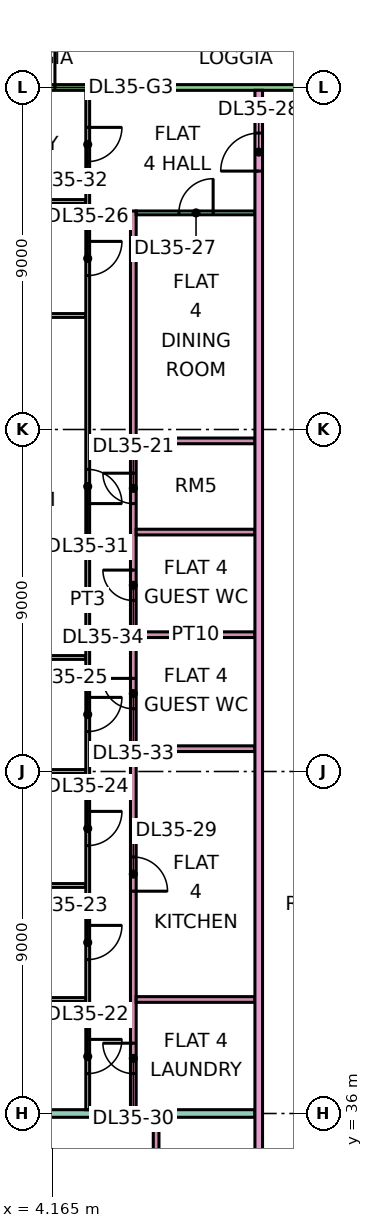
"""IFC4 building model, lengths in metres.
Left out: names, types, materials, properties, quantities, classifications, styles, units other than length and angle.
Written with IfcOpenShell. Run it as: python <this file> out.ifc"""

import sys

from ifc_helpers import new_model, si_unit, direction, frame, frame_2d, origin, place, context, subcontext, project, spatial, rectangle, extrude, element, fill, save


model = new_model("IFC4")
c1 = context("Model", 3, precision=1e-05, world=origin(), true_north=direction((0.0, 1.0)))
c2 = subcontext(c1, "Body", "Model", "MODEL_VIEW")
j1 = project(units=[si_unit("LENGTHUNIT", "METRE"), si_unit("PLANEANGLEUNIT", "RADIAN")], contexts=[c1])
p1 = place(None, origin())
s1 = spatial("IfcSite", under=j1, at=p1, CompositionType="ELEMENT")
p2 = place(p1, origin())
s2 = spatial("IfcBuilding", under=s1, at=p2, CompositionType="ELEMENT")
p3 = place(p2, frame((0.0, 0.0, 157.4)))
s3 = spatial("IfcBuildingStorey", under=s2, at=p3, CompositionType="ELEMENT", Elevation=157.4)
p4 = place(p3, frame((11.925, 63.0, 0.0), z_axis=(0.0, 0.0, 1.0), x_axis=(-1.0, 0.0, 0.0)))
e1 = element("IfcWall", 1, at=p4, inside=s3, PredefinedType="SOLIDWALL", context=c2, shape_type="SweptSolid", body=[
    extrude(rectangle(XDim=10.35, YDim=0.15, at=frame_2d((5.175, 0.0))), origin(), (0.0, 0.0, 1.0), 3.35),
])
p5 = place(p4, frame((7.688, 0.0, 0.0)))
e2 = element("IfcOpeningElement", 2, at=p5, cuts=e1, PredefinedType="OPENING", context=c2, shape_type="SweptSolid", body=[
    extrude(rectangle(XDim=1.8, YDim=2.4, at=frame_2d((0.9, 1.2))), frame((0.0, 0.085, 0.0), z_axis=(0.0, -1.0, 0.0), x_axis=(1.0, 0.0, 0.0)), (0.0, 0.0, 1.0), 0.17),
])
for number, where, z_axis, x_axis in (
    (3, (-1.351, 39.0, 0.0), (0.0, 0.0, 1.0), (1.0, 0.0, 0.0)),
    (4, (-1.351, 42.0, 0.0), (0.0, 0.0, 1.0), (1.0, 0.0, 0.0)),
    (5, (-1.351, 45.0, 0.0), (0.0, 0.0, 1.0), (1.0, 0.0, 0.0)),
):
    element("IfcWall", number, at=place(p3, frame(where, z_axis=z_axis, x_axis=x_axis)), inside=s3, PredefinedType="PARTITIONING", context=c2, shape_type="SweptSolid", body=[
        extrude(rectangle(XDim=6.401, YDim=0.1, at=frame_2d((3.201, 0.0))), origin(), (0.0, 0.0, 1.0), 3.35),
    ])
p6 = place(p3, frame((0.0, 36.0, 0.0), z_axis=(0.0, 0.0, 1.0), x_axis=(1.0, 0.0, 0.0)))
e6 = element("IfcWall", 6, at=p6, inside=s3, PredefinedType="PARTITIONING", context=c2, shape_type="SweptSolid", body=[
    extrude(rectangle(XDim=9.5, YDim=0.2, at=frame_2d((4.75, 0.0))), origin(), (0.0, 0.0, 1.0), 3.35),
])
p7 = place(p3, frame((0.0, 48.0, 0.0), z_axis=(0.0, 0.0, 1.0), x_axis=(1.0, 0.0, 0.0)))
e7 = element("IfcWall", 7, at=p7, inside=s3, PredefinedType="PARTITIONING", context=c2, shape_type="SweptSolid", body=[
    extrude(rectangle(XDim=5.05, YDim=0.1, at=frame_2d((2.525, 0.0))), origin(), (0.0, 0.0, 1.0), 3.35),
])
for number, where, z_axis, x_axis in (
    (8, (0.074, 57.0, 0.0), (0.0, 0.0, 1.0), (1.0, 0.0, 0.0)),
    (9, (0.074, 60.0, 0.0), (0.0, 0.0, 1.0), (1.0, 0.0, 0.0)),
):
    element("IfcWall", number, at=place(p3, frame(where, z_axis=z_axis, x_axis=x_axis)), inside=s3, PredefinedType="PARTITIONING", context=c2, shape_type="SweptSolid", body=[
        extrude(rectangle(XDim=4.976, YDim=0.1, at=frame_2d((2.488, 0.0))), origin(), (0.0, 0.0, 1.0), 3.35),
    ])
p8 = place(p3, frame((5.1, 36.1, 0.0), z_axis=(0.0, 0.0, 1.0), x_axis=(0.0, 1.0, 0.0)))
e10 = element("IfcWall", 10, at=p8, inside=s3, PredefinedType="PARTITIONING", context=c2, shape_type="SweptSolid", body=[
    extrude(rectangle(XDim=26.826, YDim=0.1, at=frame_2d((13.413, 0.0))), origin(), (0.0, 0.0, 1.0), 3.35),
])
p9 = place(p8, frame((0.95, 0.0, 0.0)))
e11 = element("IfcOpeningElement", 11, at=p9, cuts=e10, PredefinedType="OPENING", context=c2, shape_type="SweptSolid", body=[
    extrude(rectangle(XDim=0.9, YDim=2.1, at=frame_2d((0.45, 1.05))), frame((0.0, 0.06, 0.0), z_axis=(0.0, -1.0, 0.0), x_axis=(1.0, 0.0, 0.0)), (0.0, 0.0, 1.0), 0.12),
])
p10 = place(p8, frame((3.95, 0.0, 0.0)))
e12 = element("IfcOpeningElement", 12, at=p10, cuts=e10, PredefinedType="OPENING", context=c2, shape_type="SweptSolid", body=[
    extrude(rectangle(XDim=0.9, YDim=2.1, at=frame_2d((0.45, 1.05))), frame((0.0, 0.06, 0.0), z_axis=(0.0, -1.0, 0.0), x_axis=(1.0, 0.0, 0.0)), (0.0, 0.0, 1.0), 0.12),
])
p11 = place(p8, frame((6.95, 0.0, 0.0)))
e13 = element("IfcOpeningElement", 13, at=p11, cuts=e10, PredefinedType="OPENING", context=c2, shape_type="SweptSolid", body=[
    extrude(rectangle(XDim=0.9, YDim=2.1, at=frame_2d((0.45, 1.05))), frame((0.0, 0.06, 0.0), z_axis=(0.0, -1.0, 0.0), x_axis=(1.0, 0.0, 0.0)), (0.0, 0.0, 1.0), 0.12),
])
p12 = place(p8, frame((9.95, 0.0, 0.0)))
e14 = element("IfcOpeningElement", 14, at=p12, cuts=e10, PredefinedType="OPENING", context=c2, shape_type="SweptSolid", body=[
    extrude(rectangle(XDim=0.9, YDim=2.1, at=frame_2d((0.45, 1.05))), frame((0.0, 0.06, 0.0), z_axis=(0.0, -1.0, 0.0), x_axis=(1.0, 0.0, 0.0)), (0.0, 0.0, 1.0), 0.12),
])
p13 = place(p8, frame((21.95, 0.0, 0.0)))
e15 = element("IfcOpeningElement", 15, at=p13, cuts=e10, PredefinedType="OPENING", context=c2, shape_type="SweptSolid", body=[
    extrude(rectangle(XDim=0.9, YDim=2.1, at=frame_2d((0.45, 1.05))), frame((0.0, 0.06, 0.0), z_axis=(0.0, -1.0, 0.0), x_axis=(1.0, 0.0, 0.0)), (0.0, 0.0, 1.0), 0.12),
])
p14 = place(p8, frame((15.95, 0.0, 0.0)))
e16 = element("IfcOpeningElement", 16, at=p14, cuts=e10, PredefinedType="OPENING", context=c2, shape_type="SweptSolid", body=[
    extrude(rectangle(XDim=0.9, YDim=2.1, at=frame_2d((0.45, 1.05))), frame((0.0, 0.06, 0.0), z_axis=(0.0, -1.0, 0.0), x_axis=(1.0, 0.0, 0.0)), (0.0, 0.0, 1.0), 0.12),
])
p15 = place(p8, frame((24.95, 0.0, 0.0)))
e17 = element("IfcOpeningElement", 17, at=p15, cuts=e10, PredefinedType="OPENING", context=c2, shape_type="SweptSolid", body=[
    extrude(rectangle(XDim=0.9, YDim=2.1, at=frame_2d((0.45, 1.05))), frame((0.0, 0.06, 0.0), z_axis=(0.0, -1.0, 0.0), x_axis=(1.0, 0.0, 0.0)), (0.0, 0.0, 1.0), 0.12),
])
p16 = place(p3, frame((6.3, 36.1, 0.0), z_axis=(0.0, 0.0, 1.0), x_axis=(0.0, 1.0, 0.0)))
e18 = element("IfcWall", 18, at=p16, inside=s3, PredefinedType="PARTITIONING", context=c2, shape_type="SweptSolid", body=[
    extrude(rectangle(XDim=23.65, YDim=0.15, at=frame_2d((11.825, 0.0))), origin(), (0.0, 0.0, 1.0), 3.35),
])
p17 = place(p16, frame((15.95, 0.0, 0.0)))
e19 = element("IfcOpeningElement", 19, at=p17, cuts=e18, PredefinedType="OPENING", context=c2, shape_type="SweptSolid", body=[
    extrude(rectangle(XDim=0.8, YDim=2.1, at=frame_2d((0.4, 1.05))), frame((0.0, 0.085, 0.0), z_axis=(0.0, -1.0, 0.0), x_axis=(1.0, 0.0, 0.0)), (0.0, 0.0, 1.0), 0.17),
])
p18 = place(p16, frame((5.75, 0.0, 0.0)))
e20 = element("IfcOpeningElement", 20, at=p18, cuts=e18, PredefinedType="OPENING", context=c2, shape_type="SweptSolid", body=[
    extrude(rectangle(XDim=0.9, YDim=2.1, at=frame_2d((0.45, 1.05))), frame((0.0, 0.085, 0.0), z_axis=(0.0, -1.0, 0.0), x_axis=(1.0, 0.0, 0.0)), (0.0, 0.0, 1.0), 0.17),
])
p19 = place(p16, frame((0.95, 0.0, 0.0)))
e21 = element("IfcOpeningElement", 21, at=p19, cuts=e18, PredefinedType="OPENING", context=c2, shape_type="SweptSolid", body=[
    extrude(rectangle(XDim=0.8, YDim=2.1, at=frame_2d((0.4, 1.05))), frame((0.0, 0.085, 0.0), z_axis=(0.0, -1.0, 0.0), x_axis=(1.0, 0.0, 0.0)), (0.0, 0.0, 1.0), 0.17),
])
p20 = place(p16, frame((10.55, 0.0, 0.0)))
e22 = element("IfcOpeningElement", 22, at=p20, cuts=e18, PredefinedType="OPENING", context=c2, shape_type="SweptSolid", body=[
    extrude(rectangle(XDim=0.8, YDim=2.1, at=frame_2d((0.4, 1.05))), frame((0.0, 0.085, 0.0), z_axis=(0.0, -1.0, 0.0), x_axis=(1.0, 0.0, 0.0)), (0.0, 0.0, 1.0), 0.17),
])
p21 = place(p16, frame((13.4, 0.0, 0.0)))
e23 = element("IfcOpeningElement", 23, at=p21, cuts=e18, PredefinedType="OPENING", context=c2, shape_type="SweptSolid", body=[
    extrude(rectangle(XDim=0.8, YDim=2.1, at=frame_2d((0.4, 1.05))), frame((0.0, 0.085, 0.0), z_axis=(0.0, -1.0, 0.0), x_axis=(1.0, 0.0, 0.0)), (0.0, 0.0, 1.0), 0.17),
])
for number, where, z_axis, x_axis in (
    (24, (6.375, 39.0, 0.0), (0.0, 0.0, 1.0), (1.0, 0.0, 0.0)),
    (25, (6.375, 45.6, 0.0), (0.0, 0.0, 1.0), (1.0, 0.0, 0.0)),
    (26, (6.375, 48.6, 0.0), (0.0, 0.0, 1.0), (1.0, 0.0, 0.0)),
    (27, (6.375, 51.3, 0.0), (0.0, 0.0, 1.0), (1.0, 0.0, 0.0)),
    (28, (6.375, 53.7, 0.0), (0.0, 0.0, 1.0), (1.0, 0.0, 0.0)),
):
    element("IfcWall", number, at=place(p3, frame(where, z_axis=z_axis, x_axis=x_axis)), inside=s3, PredefinedType="PARTITIONING", context=c2, shape_type="SweptSolid", body=[
        extrude(rectangle(XDim=3.125, YDim=0.15, at=frame_2d((1.562, 0.0))), origin(), (0.0, 0.0, 1.0), 3.35),
    ])
p22 = place(p3, frame((6.375, 59.7, 0.0), z_axis=(0.0, 0.0, 1.0), x_axis=(1.0, 0.0, 0.0)))
e29 = element("IfcWall", 29, at=p22, inside=s3, PredefinedType="PARTITIONING", context=c2, shape_type="SweptSolid", body=[
    extrude(rectangle(XDim=3.125, YDim=0.1, at=frame_2d((1.562, 0.0))), origin(), (0.0, 0.0, 1.0), 3.35),
])
p23 = place(p22, frame((1.125, 0.0, 0.0)))
e30 = element("IfcOpeningElement", 30, at=p23, cuts=e29, PredefinedType="OPENING", context=c2, shape_type="SweptSolid", body=[
    extrude(rectangle(XDim=0.9, YDim=2.1, at=frame_2d((0.45, 1.05))), frame((0.0, 0.06, 0.0), z_axis=(0.0, -1.0, 0.0), x_axis=(1.0, 0.0, 0.0)), (0.0, 0.0, 1.0), 0.12),
])
p24 = place(p3, frame((6.9, 29.325, 0.0), z_axis=(0.0, 0.0, 1.0), x_axis=(0.0, 1.0, 0.0)))
e31 = element("IfcWall", 31, at=p24, inside=s3, PredefinedType="PARTITIONING", context=c2, shape_type="SweptSolid", body=[
    extrude(rectangle(XDim=6.575, YDim=0.15, at=frame_2d((3.288, 0.0))), origin(), (0.0, 0.0, 1.0), 3.35),
])
p25 = place(p24, frame((4.575, 0.0, 0.0)))
e32 = element("IfcOpeningElement", 32, at=p25, cuts=e31, PredefinedType="OPENING", context=c2, shape_type="SweptSolid", body=[
    extrude(rectangle(XDim=0.9, YDim=2.1, at=frame_2d((0.45, 1.05))), frame((0.0, 0.085, 0.0), z_axis=(0.0, -1.0, 0.0), x_axis=(1.0, 0.0, 0.0)), (0.0, 0.0, 1.0), 0.17),
])
p26 = place(p3, frame((9.6, 20.0, 0.0), z_axis=(0.0, 0.0, 1.0), x_axis=(0.0, 1.0, 0.0)))
e33 = element("IfcWall", 33, at=p26, inside=s3, PredefinedType="PARTITIONING", context=c2, shape_type="SweptSolid", body=[
    extrude(rectangle(XDim=42.926, YDim=0.2, at=frame_2d((21.463, 0.0))), origin(), (0.0, 0.0, 1.0), 3.35),
])
p27 = place(p26, frame((40.8, 0.0, 0.0)))
e34 = element("IfcOpeningElement", 34, at=p27, cuts=e33, PredefinedType="OPENING", context=c2, shape_type="SweptSolid", body=[
    extrude(rectangle(XDim=1.0, YDim=2.1, at=frame_2d((0.5, 1.05))), frame((0.0, 0.11, 0.0), z_axis=(0.0, -1.0, 0.0), x_axis=(1.0, 0.0, 0.0)), (0.0, 0.0, 1.0), 0.22),
])
p28 = place(p26, frame((0.6, 0.0, 0.0)))
e35 = element("IfcOpeningElement", 35, at=p28, cuts=e33, PredefinedType="OPENING", context=c2, shape_type="SweptSolid", body=[
    extrude(rectangle(XDim=1.2, YDim=2.1, at=frame_2d((0.6, 1.05))), frame((0.0, 0.11, 0.0), z_axis=(0.0, -1.0, 0.0), x_axis=(1.0, 0.0, 0.0)), (0.0, 0.0, 1.0), 0.22),
])
p29 = place(p26, frame((3.9, 0.0, 0.0)))
e36 = element("IfcOpeningElement", 36, at=p29, cuts=e33, PredefinedType="OPENING", context=c2, shape_type="SweptSolid", body=[
    extrude(rectangle(XDim=1.0, YDim=2.1, at=frame_2d((0.5, 1.05))), frame((0.0, 0.11, 0.0), z_axis=(0.0, -1.0, 0.0), x_axis=(1.0, 0.0, 0.0)), (0.0, 0.0, 1.0), 0.22),
])
p30 = place(p5, frame((1.8, 0.0, 0.0), z_axis=(0.0, 0.0, 1.0), x_axis=(-1.0, 0.0, 0.0)))
e37 = element("IfcDoor", 37, at=p30, inside=s3, OperationType="DOUBLE_DOOR_SINGLE_SWING", PredefinedType="DOOR", context=c2, shape_type="SweptSolid", body=[
    extrude(rectangle(XDim=1.8, YDim=2.4, at=frame_2d((0.9, 1.2))), frame((0.0, 0.025, 0.0), z_axis=(0.0, -1.0, 0.0), x_axis=(1.0, 0.0, 0.0)), (0.0, 0.0, 1.0), 0.05),
])
fill(e2, e37)
p31 = place(p17, frame((0.8, 0.0, 0.0), z_axis=(0.0, 0.0, 1.0), x_axis=(-1.0, 0.0, 0.0)))
e38 = element("IfcDoor", 38, at=p31, inside=s3, OperationType="SINGLE_SWING_RIGHT", PredefinedType="DOOR", context=c2, shape_type="SweptSolid", body=[
    extrude(rectangle(XDim=0.8, YDim=2.1, at=frame_2d((0.4, 1.05))), frame((0.0, 0.025, 0.0), z_axis=(0.0, -1.0, 0.0), x_axis=(1.0, 0.0, 0.0)), (0.0, 0.0, 1.0), 0.05),
])
fill(e19, e38)
p32 = place(p9, origin())
e39 = element("IfcDoor", 39, at=p32, inside=s3, OperationType="SINGLE_SWING_RIGHT", PredefinedType="DOOR", context=c2, shape_type="SweptSolid", body=[
    extrude(rectangle(XDim=0.9, YDim=2.1, at=frame_2d((0.45, 1.05))), frame((0.0, 0.025, 0.0), z_axis=(0.0, -1.0, 0.0), x_axis=(1.0, 0.0, 0.0)), (0.0, 0.0, 1.0), 0.05),
])
fill(e11, e39)
p33 = place(p10, origin())
e40 = element("IfcDoor", 40, at=p33, inside=s3, OperationType="SINGLE_SWING_RIGHT", PredefinedType="DOOR", context=c2, shape_type="SweptSolid", body=[
    extrude(rectangle(XDim=0.9, YDim=2.1, at=frame_2d((0.45, 1.05))), frame((0.0, 0.025, 0.0), z_axis=(0.0, -1.0, 0.0), x_axis=(1.0, 0.0, 0.0)), (0.0, 0.0, 1.0), 0.05),
])
fill(e12, e40)
p34 = place(p11, origin())
e41 = element("IfcDoor", 41, at=p34, inside=s3, OperationType="SINGLE_SWING_RIGHT", PredefinedType="DOOR", context=c2, shape_type="SweptSolid", body=[
    extrude(rectangle(XDim=0.9, YDim=2.1, at=frame_2d((0.45, 1.05))), frame((0.0, 0.025, 0.0), z_axis=(0.0, -1.0, 0.0), x_axis=(1.0, 0.0, 0.0)), (0.0, 0.0, 1.0), 0.05),
])
fill(e13, e41)
p35 = place(p12, origin())
e42 = element("IfcDoor", 42, at=p35, inside=s3, OperationType="SINGLE_SWING_RIGHT", PredefinedType="DOOR", context=c2, shape_type="SweptSolid", body=[
    extrude(rectangle(XDim=0.9, YDim=2.1, at=frame_2d((0.45, 1.05))), frame((0.0, 0.025, 0.0), z_axis=(0.0, -1.0, 0.0), x_axis=(1.0, 0.0, 0.0)), (0.0, 0.0, 1.0), 0.05),
])
fill(e14, e42)
p36 = place(p13, origin())
e43 = element("IfcDoor", 43, at=p36, inside=s3, OperationType="SINGLE_SWING_RIGHT", PredefinedType="DOOR", context=c2, shape_type="SweptSolid", body=[
    extrude(rectangle(XDim=0.9, YDim=2.1, at=frame_2d((0.45, 1.05))), frame((0.0, 0.025, 0.0), z_axis=(0.0, -1.0, 0.0), x_axis=(1.0, 0.0, 0.0)), (0.0, 0.0, 1.0), 0.05),
])
fill(e15, e43)
p37 = place(p23, frame((0.9, 0.0, 0.0), z_axis=(0.0, 0.0, 1.0), x_axis=(-1.0, 0.0, 0.0)))
e44 = element("IfcDoor", 44, at=p37, inside=s3, OperationType="SINGLE_SWING_RIGHT", PredefinedType="DOOR", context=c2, shape_type="SweptSolid", body=[
    extrude(rectangle(XDim=0.9, YDim=2.1, at=frame_2d((0.45, 1.05))), frame((0.0, 0.025, 0.0), z_axis=(0.0, -1.0, 0.0), x_axis=(1.0, 0.0, 0.0)), (0.0, 0.0, 1.0), 0.05),
])
fill(e30, e44)
p38 = place(p27, origin())
e45 = element("IfcDoor", 45, at=p38, inside=s3, OperationType="SINGLE_SWING_LEFT", PredefinedType="DOOR", context=c2, shape_type="SweptSolid", body=[
    extrude(rectangle(XDim=1.0, YDim=2.1, at=frame_2d((0.5, 1.05))), frame((0.0, 0.025, 0.0), z_axis=(0.0, -1.0, 0.0), x_axis=(1.0, 0.0, 0.0)), (0.0, 0.0, 1.0), 0.05),
])
fill(e34, e45)
p39 = place(p18, frame((0.9, 0.0, 0.0), z_axis=(0.0, 0.0, 1.0), x_axis=(-1.0, 0.0, 0.0)))
e46 = element("IfcDoor", 46, at=p39, inside=s3, OperationType="SINGLE_SWING_LEFT", PredefinedType="DOOR", context=c2, shape_type="SweptSolid", body=[
    extrude(rectangle(XDim=0.9, YDim=2.1, at=frame_2d((0.45, 1.05))), frame((0.0, 0.025, 0.0), z_axis=(0.0, -1.0, 0.0), x_axis=(1.0, 0.0, 0.0)), (0.0, 0.0, 1.0), 0.05),
])
fill(e20, e46)
p40 = place(p19, frame((0.8, 0.0, 0.0), z_axis=(0.0, 0.0, 1.0), x_axis=(-1.0, 0.0, 0.0)))
e47 = element("IfcDoor", 47, at=p40, inside=s3, OperationType="SINGLE_SWING_RIGHT", PredefinedType="DOOR", context=c2, shape_type="SweptSolid", body=[
    extrude(rectangle(XDim=0.8, YDim=2.1, at=frame_2d((0.4, 1.05))), frame((0.0, 0.025, 0.0), z_axis=(0.0, -1.0, 0.0), x_axis=(1.0, 0.0, 0.0)), (0.0, 0.0, 1.0), 0.05),
])
fill(e21, e47)
p41 = place(p14, frame((0.9, 0.0, 0.0), z_axis=(0.0, 0.0, 1.0), x_axis=(-1.0, 0.0, 0.0)))
e48 = element("IfcDoor", 48, at=p41, inside=s3, OperationType="SINGLE_SWING_LEFT", PredefinedType="DOOR", context=c2, shape_type="SweptSolid", body=[
    extrude(rectangle(XDim=0.9, YDim=2.1, at=frame_2d((0.45, 1.05))), frame((0.0, 0.025, 0.0), z_axis=(0.0, -1.0, 0.0), x_axis=(1.0, 0.0, 0.0)), (0.0, 0.0, 1.0), 0.05),
])
fill(e16, e48)
p42 = place(p15, origin())
e49 = element("IfcDoor", 49, at=p42, inside=s3, OperationType="SINGLE_SWING_RIGHT", PredefinedType="DOOR", context=c2, shape_type="SweptSolid", body=[
    extrude(rectangle(XDim=0.9, YDim=2.1, at=frame_2d((0.45, 1.05))), frame((0.0, 0.025, 0.0), z_axis=(0.0, -1.0, 0.0), x_axis=(1.0, 0.0, 0.0)), (0.0, 0.0, 1.0), 0.05),
])
fill(e17, e49)
p43 = place(p20, frame((0.8, 0.0, 0.0), z_axis=(0.0, 0.0, 1.0), x_axis=(-1.0, 0.0, 0.0)))
e50 = element("IfcDoor", 50, at=p43, inside=s3, OperationType="SINGLE_SWING_RIGHT", PredefinedType="DOOR", context=c2, shape_type="SweptSolid", body=[
    extrude(rectangle(XDim=0.8, YDim=2.1, at=frame_2d((0.4, 1.05))), frame((0.0, 0.025, 0.0), z_axis=(0.0, -1.0, 0.0), x_axis=(1.0, 0.0, 0.0)), (0.0, 0.0, 1.0), 0.05),
])
fill(e22, e50)
p44 = place(p21, frame((0.8, 0.0, 0.0), z_axis=(0.0, 0.0, 1.0), x_axis=(-1.0, 0.0, 0.0)))
e51 = element("IfcDoor", 51, at=p44, inside=s3, OperationType="SINGLE_SWING_RIGHT", PredefinedType="DOOR", context=c2, shape_type="SweptSolid", body=[
    extrude(rectangle(XDim=0.8, YDim=2.1, at=frame_2d((0.4, 1.05))), frame((0.0, 0.025, 0.0), z_axis=(0.0, -1.0, 0.0), x_axis=(1.0, 0.0, 0.0)), (0.0, 0.0, 1.0), 0.05),
])
fill(e23, e51)
save(model, sys.argv[1])
